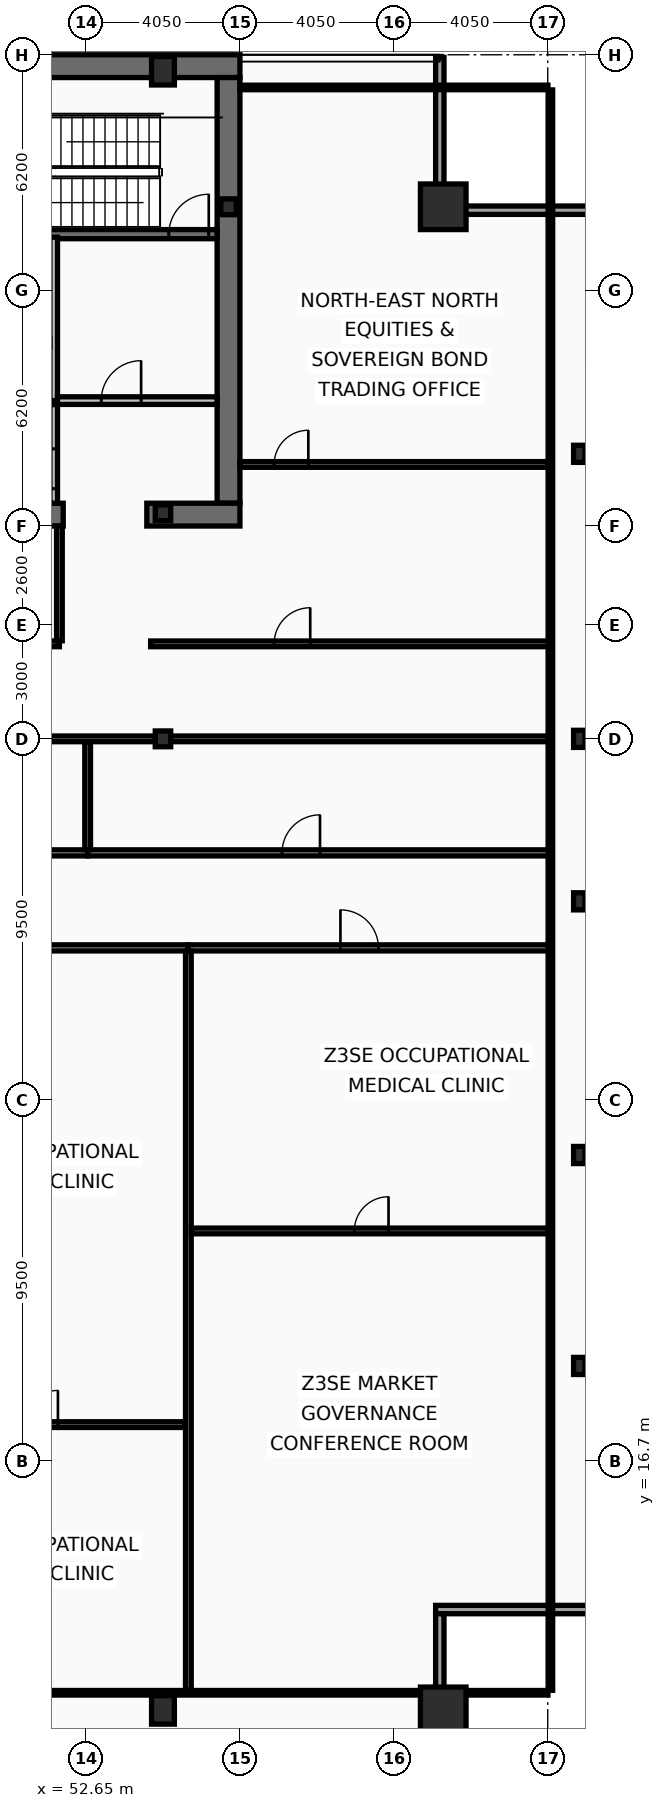
"""IFC4 building model, lengths in metres.
Left out: names, types, materials, properties, quantities, classifications, styles, units other than length and angle.
Written with IfcOpenShell. Run it as: python <this file> out.ifc"""

import sys

from ifc_helpers import new_model, si_unit, direction, frame, frame_2d, origin, origin_2d, place, context, subcontext, project, spatial, rectangle, hollow_rectangle, i_section, extrude, element, fill, save


model = new_model("IFC4")
c1 = context("Model", 3, precision=1e-05, world=origin(), true_north=direction((0.0, 1.0)))
c2 = subcontext(c1, "Body", "Model", "MODEL_VIEW")
j1 = project(units=[si_unit("LENGTHUNIT", "METRE"), si_unit("PLANEANGLEUNIT", "RADIAN")], contexts=[c1])
p1 = place(None, origin())
s1 = spatial("IfcSite", under=j1, at=p1, CompositionType="ELEMENT")
p2 = place(p1, origin())
s2 = spatial("IfcBuilding", under=s1, at=p2, CompositionType="ELEMENT")
p3 = place(p2, frame((0.0, 0.0, 224.6)))
s3 = spatial("IfcBuildingStorey", under=s2, at=p3, CompositionType="ELEMENT", Elevation=224.6)
p4 = place(p3, frame((16.2, 53.4, 0.0), z_axis=(0.0, 0.0, 1.0), x_axis=(1.0, 0.0, 0.0)))
e1 = element("IfcWall", 1, at=p4, inside=s3, PredefinedType="SHEAR", context=c2, shape_type="SweptSolid", body=[
    extrude(rectangle(XDim=40.5, YDim=0.6, at=frame_2d((20.25, 0.0))), origin(), (0.0, 0.0, 1.0), 3.44),
])
p5 = place(p3, frame((56.4, 53.1, 0.0), z_axis=(0.0, 0.0, 1.0), x_axis=(0.0, -1.0, 0.0)))
e2 = element("IfcWall", 2, at=p5, inside=s3, PredefinedType="SHEAR", context=c2, shape_type="SweptSolid", body=[
    extrude(rectangle(XDim=11.2, YDim=0.6, at=frame_2d((5.6, 0.0))), origin(), (0.0, 0.0, 1.0), 3.44),
])
p6 = place(p3, frame((52.05, 41.6, 0.0), z_axis=(0.0, 0.0, 1.0), x_axis=(-1.0, 0.0, 0.0)))
e3 = element("IfcWall", 3, at=p6, inside=s3, PredefinedType="SHEAR", context=c2, shape_type="SweptSolid", body=[
    extrude(rectangle(XDim=11.3, YDim=0.6, at=frame_2d((5.65, 0.0))), origin(), (0.0, 0.0, 1.0), 3.44),
])
p7 = place(p3, frame((56.7, 41.6, 0.0), z_axis=(0.0, 0.0, 1.0), x_axis=(-1.0, 0.0, 0.0)))
e4 = element("IfcWall", 4, at=p7, inside=s3, PredefinedType="SHEAR", context=c2, shape_type="SweptSolid", body=[
    extrude(rectangle(XDim=2.45, YDim=0.6, at=frame_2d((1.225, 0.0))), origin(), (0.0, 0.0, 1.0), 3.44),
])
p8 = place(p3, frame((48.63, 48.98, 0.0), z_axis=(0.0, 0.0, 1.0), x_axis=(1.0, 0.0, 0.0)))
e5 = element("IfcWall", 5, at=p8, inside=s3, PredefinedType="SHEAR", context=c2, shape_type="SweptSolid", body=[
    extrude(rectangle(XDim=7.47, YDim=0.24, at=frame_2d((3.735, 0.0))), origin(), (0.0, 0.0, 1.0), 3.44),
])
p9 = place(p8, frame((6.2, 0.0, 0.0)))
e6 = element("IfcOpeningElement", 6, at=p9, cuts=e5, PredefinedType="OPENING", context=c2, shape_type="SweptSolid", body=[
    extrude(rectangle(XDim=1.05, YDim=2.15, at=frame_2d((0.525, 1.075))), frame((0.0, 0.13, 0.0), z_axis=(0.0, -1.0, 0.0), x_axis=(1.0, 0.0, 0.0)), (0.0, 0.0, 1.0), 0.26),
])
for number, where, z_axis, x_axis in (
    (7, (62.05, 10.15, 0.0), (0.0, 0.0, 1.0), (1.0, 0.0, 0.0)),
    (8, (62.05, 49.7, 0.0), (0.0, 0.0, 1.0), (1.0, 0.0, 0.0)),
):
    element("IfcColumn", number, at=place(p3, frame(where, z_axis=z_axis, x_axis=x_axis)), inside=s3, PredefinedType="COLUMN", context=c2, shape_type="SweptSolid", body=[
        extrude(hollow_rectangle(XDim=1.2, YDim=1.2, WallThickness=0.06, at=origin_2d()), origin(), (0.0, 0.0, 1.0), 3.6),
    ])
for number, where, z_axis, x_axis in (
    (9, (54.675, 10.15, 0.0), (0.0, 0.0, 1.0), (1.0, 0.0, 0.0)),
    (10, (54.675, 53.28, 0.0), (0.0, 0.0, 1.0), (1.0, 0.0, 0.0)),
):
    element("IfcColumn", number, at=place(p3, frame(where, z_axis=z_axis, x_axis=x_axis)), inside=s3, PredefinedType="COLUMN", context=c2, shape_type="SweptSolid", body=[
        extrude(hollow_rectangle(XDim=0.6, YDim=0.75, WallThickness=0.045, at=origin_2d()), origin(), (0.0, 0.0, 1.0), 3.6),
    ])
for number, where, z_axis, x_axis in (
    (11, (65.63, 19.2, 0.0), (0.0, 0.0, 1.0), (1.0, 0.0, 0.0)),
    (12, (65.63, 24.75, 0.0), (0.0, 0.0, 1.0), (1.0, 0.0, 0.0)),
    (13, (65.63, 31.425, 0.0), (0.0, 0.0, 1.0), (1.0, 0.0, 0.0)),
    (14, (65.63, 35.7, 0.0), (0.0, 0.0, 1.0), (1.0, 0.0, 0.0)),
    (15, (65.63, 43.2, 0.0), (0.0, 0.0, 1.0), (1.0, 0.0, 0.0)),
):
    element("IfcColumn", number, at=place(p3, frame(where, z_axis=z_axis, x_axis=x_axis)), inside=s3, PredefinedType="COLUMN", context=c2, shape_type="SweptSolid", body=[
        extrude(i_section(OverallWidth=0.3, OverallDepth=0.45, WebThickness=0.014, FlangeThickness=0.026, at=origin_2d()), origin(), (0.0, 0.0, 1.0), 3.6),
    ])
for number, where, z_axis, x_axis in (
    (16, (56.4, 49.7, 0.0), (0.0, 0.0, 1.0), (1.0, 0.0, 0.0)),
    (17, (54.675, 35.7, 0.0), (0.0, 0.0, 1.0), (1.0, 0.0, 0.0)),
    (18, (54.675, 41.65, 0.0), (0.0, 0.0, 1.0), (1.0, 0.0, 0.0)),
):
    element("IfcColumn", number, at=place(p3, frame(where, z_axis=z_axis, x_axis=x_axis)), inside=s3, PredefinedType="COLUMN", context=c2, shape_type="SweptSolid", body=[
        extrude(i_section(OverallWidth=0.406, OverallDepth=0.416, WebThickness=0.03, FlangeThickness=0.048, at=origin_2d()), origin(), (0.0, 0.0, 1.0), 3.6),
    ])
p10 = place(p3, frame((61.96, 53.63, 0.0), z_axis=(0.0, 0.0, 1.0), x_axis=(0.0, -1.0, 0.0)))
e19 = element("IfcWall", 19, at=p10, inside=s3, PredefinedType="SOLIDWALL", context=c2, shape_type="SweptSolid", body=[
    extrude(rectangle(XDim=3.91, YDim=0.22, at=frame_2d((1.955, 0.0))), origin(), (0.0, 0.0, 1.0), 2.83),
])
for number, where, z_axis, x_axis in (
    (20, (61.85, 49.61, 0.0), (0.0, 0.0, 1.0), (1.0, 0.0, 0.0)),
    (21, (66.07, 12.79, 0.0), (0.0, 0.0, 1.0), (-1.0, 0.0, 0.0)),
):
    element("IfcWall", number, at=place(p3, frame(where, z_axis=z_axis, x_axis=x_axis)), inside=s3, PredefinedType="SOLIDWALL", context=c2, shape_type="SweptSolid", body=[
        extrude(rectangle(XDim=4.22, YDim=0.22, at=frame_2d((2.11, 0.0))), origin(), (0.0, 0.0, 1.0), 2.83),
    ])
p11 = place(p3, frame((61.96, 12.68, 0.0), z_axis=(0.0, 0.0, 1.0), x_axis=(0.0, -1.0, 0.0)))
e22 = element("IfcWall", 22, at=p11, inside=s3, PredefinedType="SOLIDWALL", context=c2, shape_type="SweptSolid", body=[
    extrude(rectangle(XDim=3.91, YDim=0.22, at=frame_2d((1.955, 0.0))), origin(), (0.0, 0.0, 1.0), 2.83),
])
p12 = place(p3, frame((51.8, 44.6, 0.0), z_axis=(0.0, 0.0, 1.0), x_axis=(0.0, 1.0, 0.0)))
e23 = element("IfcWall", 23, at=p12, inside=s3, PredefinedType="PARTITIONING", context=c2, shape_type="SweptSolid", body=[
    extrude(rectangle(XDim=4.3, YDim=0.2, at=frame_2d((2.15, 0.0))), origin(), (0.0, 0.0, 1.0), 3.44),
])
p13 = place(p3, frame((51.9, 44.6, 0.0), z_axis=(0.0, 0.0, 1.0), x_axis=(1.0, 0.0, 0.0)))
e24 = element("IfcWall", 24, at=p13, inside=s3, PredefinedType="PARTITIONING", context=c2, shape_type="SweptSolid", body=[
    extrude(rectangle(XDim=4.2, YDim=0.2, at=frame_2d((2.1, 0.0))), origin(), (0.0, 0.0, 1.0), 3.44),
])
p14 = place(p13, frame((1.15, 0.0, 0.0)))
e25 = element("IfcOpeningElement", 25, at=p14, cuts=e24, PredefinedType="OPENING", context=c2, shape_type="SweptSolid", body=[
    extrude(rectangle(XDim=1.05, YDim=2.15, at=frame_2d((0.525, 1.075))), frame((0.0, 0.11, 0.0), z_axis=(0.0, -1.0, 0.0), x_axis=(1.0, 0.0, 0.0)), (0.0, 0.0, 1.0), 0.22),
])
p15 = place(p3, frame((51.8, 41.9, 0.0), z_axis=(0.0, 0.0, 1.0), x_axis=(0.0, 1.0, 0.0)))
e26 = element("IfcWall", 26, at=p15, inside=s3, PredefinedType="PARTITIONING", context=c2, shape_type="SweptSolid", body=[
    extrude(rectangle(XDim=2.595, YDim=0.2, at=frame_2d((1.298, 0.0))), origin(), (0.0, 0.0, 1.0), 3.44),
])
p16 = place(p15, frame((0.38, 0.0, 0.0)))
e27 = element("IfcOpeningElement", 27, at=p16, cuts=e26, PredefinedType="OPENING", context=c2, shape_type="SweptSolid", body=[
    extrude(rectangle(XDim=1.05, YDim=2.15, at=frame_2d((0.525, 1.075))), frame((0.0, 0.11, 0.0), z_axis=(0.0, -1.0, 0.0), x_axis=(1.0, 0.0, 0.0)), (0.0, 0.0, 1.0), 0.22),
])
p17 = place(p3, frame((47.8, 38.2, 0.0), z_axis=(0.0, 0.0, 1.0), x_axis=(1.0, 0.0, 0.0)))
e28 = element("IfcWall", 28, at=p17, inside=s3, PredefinedType="PARTITIONING", context=c2, shape_type="SweptSolid", body=[
    extrude(rectangle(XDim=4.15, YDim=0.15, at=frame_2d((2.075, 0.0))), origin(), (0.0, 0.0, 1.0), 2.78),
])
p18 = place(p17, frame((1.1, 0.0, 0.0)))
e29 = element("IfcOpeningElement", 29, at=p18, cuts=e28, PredefinedType="OPENING", context=c2, shape_type="SweptSolid", body=[
    extrude(rectangle(XDim=1.0, YDim=2.05, at=frame_2d((0.5, 1.025))), frame((0.0, 0.085, 0.0), z_axis=(0.0, -1.0, 0.0), x_axis=(1.0, 0.0, 0.0)), (0.0, 0.0, 1.0), 0.17),
])
p19 = place(p3, frame((51.95, 38.28, 0.0), z_axis=(0.0, 0.0, 1.0), x_axis=(0.0, 1.0, 0.0)))
e30 = element("IfcWall", 30, at=p19, inside=s3, PredefinedType="PARTITIONING", context=c2, shape_type="SweptSolid", body=[
    extrude(rectangle(XDim=3.02, YDim=0.15, at=frame_2d((1.51, 0.0))), origin(), (0.0, 0.0, 1.0), 3.44),
])
p20 = place(p3, frame((54.35, 38.2, 0.0), z_axis=(0.0, 0.0, 1.0), x_axis=(1.0, 0.0, 0.0)))
e31 = element("IfcWall", 31, at=p20, inside=s3, PredefinedType="PARTITIONING", context=c2, shape_type="SweptSolid", body=[
    extrude(rectangle(XDim=10.52, YDim=0.15, at=frame_2d((5.26, 0.0))), origin(), (0.0, 0.0, 1.0), 2.78),
])
p21 = place(p20, frame((3.25, 0.0, 0.0)))
e32 = element("IfcOpeningElement", 32, at=p21, cuts=e31, PredefinedType="OPENING", context=c2, shape_type="SweptSolid", body=[
    extrude(rectangle(XDim=0.95, YDim=2.05, at=frame_2d((0.475, 1.025))), frame((0.0, 0.085, 0.0), z_axis=(0.0, -1.0, 0.0), x_axis=(1.0, 0.0, 0.0)), (0.0, 0.0, 1.0), 0.17),
])
p22 = place(p3, frame((56.7, 42.92, 0.0), z_axis=(0.0, 0.0, 1.0), x_axis=(1.0, 0.0, 0.0)))
e33 = element("IfcWall", 33, at=p22, inside=s3, PredefinedType="PARTITIONING", context=c2, shape_type="SweptSolid", body=[
    extrude(rectangle(XDim=8.105, YDim=0.15, at=frame_2d((4.052, 0.0))), origin(), (0.0, 0.0, 1.0), 2.78),
])
p23 = place(p22, frame((0.9, 0.0, 0.0)))
e34 = element("IfcOpeningElement", 34, at=p23, cuts=e33, PredefinedType="OPENING", context=c2, shape_type="SweptSolid", body=[
    extrude(rectangle(XDim=0.9, YDim=2.05, at=frame_2d((0.45, 1.025))), frame((0.0, 0.085, 0.0), z_axis=(0.0, -1.0, 0.0), x_axis=(1.0, 0.0, 0.0)), (0.0, 0.0, 1.0), 0.17),
])
p24 = place(p3, frame((39.88, 35.7, 0.0), z_axis=(0.0, 0.0, 1.0), x_axis=(1.0, 0.0, 0.0)))
e35 = element("IfcWall", 35, at=p24, inside=s3, PredefinedType="PARTITIONING", context=c2, shape_type="SweptSolid", body=[
    extrude(rectangle(XDim=24.925, YDim=0.15, at=frame_2d((12.462, 0.0))), origin(), (0.0, 0.0, 1.0), 2.78),
])
p25 = place(p3, frame((47.321, 30.2, 0.0), z_axis=(0.0, 0.0, 1.0), x_axis=(1.0, 0.0, 0.0)))
e36 = element("IfcWall", 36, at=p25, inside=s3, PredefinedType="PARTITIONING", context=c2, shape_type="SweptSolid", body=[
    extrude(rectangle(XDim=8.022, YDim=0.16, at=frame_2d((4.011, 0.0))), origin(), (0.0, 0.0, 1.0), 2.78),
])
p26 = place(p25, frame((3.369, 0.0, 0.0)))
e37 = element("IfcOpeningElement", 37, at=p26, cuts=e36, PredefinedType="OPENING", context=c2, shape_type="SweptSolid", body=[
    extrude(rectangle(XDim=1.0, YDim=2.05, at=frame_2d((0.5, 1.025))), frame((0.0, 0.09, 0.0), z_axis=(0.0, -1.0, 0.0), x_axis=(1.0, 0.0, 0.0)), (0.0, 0.0, 1.0), 0.18),
])
p27 = place(p3, frame((47.401, 17.656, 0.0), z_axis=(0.0, 0.0, 1.0), x_axis=(1.0, 0.0, 0.0)))
e38 = element("IfcWall", 38, at=p27, inside=s3, PredefinedType="PARTITIONING", context=c2, shape_type="SweptSolid", body=[
    extrude(rectangle(XDim=7.863, YDim=0.15, at=frame_2d((3.931, 0.0))), origin(), (0.0, 0.0, 1.0), 2.78),
])
p28 = place(p27, frame((3.61, 0.0, 0.0)))
e39 = element("IfcOpeningElement", 39, at=p28, cuts=e38, PredefinedType="OPENING", context=c2, shape_type="SweptSolid", body=[
    extrude(rectangle(XDim=0.9, YDim=2.05, at=frame_2d((0.45, 1.025))), frame((0.0, 0.085, 0.0), z_axis=(0.0, -1.0, 0.0), x_axis=(1.0, 0.0, 0.0)), (0.0, 0.0, 1.0), 0.17),
])
p29 = place(p3, frame((55.344, 30.2, 0.0), z_axis=(0.0, 0.0, 1.0), x_axis=(1.0, 0.0, 0.0)))
e40 = element("IfcWall", 40, at=p29, inside=s3, PredefinedType="PARTITIONING", context=c2, shape_type="SweptSolid", body=[
    extrude(rectangle(XDim=9.527, YDim=0.16, at=frame_2d((4.763, 0.0))), origin(), (0.0, 0.0, 1.0), 3.44),
])
p30 = place(p29, frame((4.001, 0.0, 0.0)))
e41 = element("IfcOpeningElement", 41, at=p30, cuts=e40, PredefinedType="OPENING", context=c2, shape_type="SweptSolid", body=[
    extrude(rectangle(XDim=1.0, YDim=2.05, at=frame_2d((0.5, 1.025))), frame((0.0, 0.09, 0.0), z_axis=(0.0, -1.0, 0.0), x_axis=(1.0, 0.0, 0.0)), (0.0, 0.0, 1.0), 0.18),
])
p31 = place(p3, frame((55.344, 10.665, 0.0), z_axis=(0.0, 0.0, 1.0), x_axis=(0.0, 1.0, 0.0)))
e42 = element("IfcWall", 42, at=p31, inside=s3, PredefinedType="PARTITIONING", context=c2, shape_type="SweptSolid", body=[
    extrude(rectangle(XDim=19.45, YDim=0.15, at=frame_2d((9.725, 0.0))), origin(), (0.0, 0.0, 1.0), 2.78),
])
p32 = place(p3, frame((55.423, 22.752, 0.0), z_axis=(0.0, 0.0, 1.0), x_axis=(1.0, 0.0, 0.0)))
e43 = element("IfcWall", 43, at=p32, inside=s3, PredefinedType="PARTITIONING", context=c2, shape_type="SweptSolid", body=[
    extrude(rectangle(XDim=9.382, YDim=0.15, at=frame_2d((4.691, 0.0))), origin(), (0.0, 0.0, 1.0), 3.44),
])
p33 = place(p32, frame((4.287, 0.0, 0.0)))
e44 = element("IfcOpeningElement", 44, at=p33, cuts=e43, PredefinedType="OPENING", context=c2, shape_type="SweptSolid", body=[
    extrude(rectangle(XDim=0.9, YDim=2.05, at=frame_2d((0.45, 1.025))), frame((0.0, 0.085, 0.0), z_axis=(0.0, -1.0, 0.0), x_axis=(1.0, 0.0, 0.0)), (0.0, 0.0, 1.0), 0.17),
])
p34 = place(p3, frame((39.8, 32.7, 0.0), z_axis=(0.0, 0.0, 1.0), x_axis=(1.0, 0.0, 0.0)))
e45 = element("IfcWall", 45, at=p34, inside=s3, PredefinedType="PARTITIONING", context=c2, shape_type="SweptSolid", body=[
    extrude(rectangle(XDim=12.893, YDim=0.16, at=frame_2d((6.447, 0.0))), origin(), (0.0, 0.0, 1.0), 2.78),
])
p35 = place(p34, frame((5.415, 0.0, 0.0)))
e46 = element("IfcOpeningElement", 46, at=p35, cuts=e45, PredefinedType="OPENING", context=c2, shape_type="SweptSolid", body=[
    extrude(rectangle(XDim=1.0, YDim=2.05, at=frame_2d((0.5, 1.025))), frame((0.0, 0.09, 0.0), z_axis=(0.0, -1.0, 0.0), x_axis=(1.0, 0.0, 0.0)), (0.0, 0.0, 1.0), 0.18),
])
p36 = place(p3, frame((52.693, 32.7, 0.0), z_axis=(0.0, 0.0, 1.0), x_axis=(1.0, 0.0, 0.0)))
e47 = element("IfcWall", 47, at=p36, inside=s3, PredefinedType="PARTITIONING", context=c2, shape_type="SweptSolid", body=[
    extrude(rectangle(XDim=12.177, YDim=0.16, at=frame_2d((6.088, 0.0))), origin(), (0.0, 0.0, 1.0), 2.78),
])
p37 = place(p36, frame((5.114, 0.0, 0.0)))
e48 = element("IfcOpeningElement", 48, at=p37, cuts=e47, PredefinedType="OPENING", context=c2, shape_type="SweptSolid", body=[
    extrude(rectangle(XDim=1.0, YDim=2.05, at=frame_2d((0.5, 1.025))), frame((0.0, 0.09, 0.0), z_axis=(0.0, -1.0, 0.0), x_axis=(1.0, 0.0, 0.0)), (0.0, 0.0, 1.0), 0.18),
])
p38 = place(p3, frame((52.693, 32.785, 0.0), z_axis=(0.0, 0.0, 1.0), x_axis=(0.0, 1.0, 0.0)))
e49 = element("IfcWall", 49, at=p38, inside=s3, PredefinedType="PARTITIONING", context=c2, shape_type="SweptSolid", body=[
    extrude(rectangle(XDim=2.835, YDim=0.15, at=frame_2d((1.417, 0.0))), origin(), (0.0, 0.0, 1.0), 2.98),
])
p39 = place(p3, frame((64.87, 10.665, 0.0), z_axis=(0.0, 0.0, 1.0), x_axis=(0.0, 1.0, 0.0)))
e50 = element("IfcWall", 50, at=p39, inside=s3, PredefinedType="PARTITIONING", context=c2, shape_type="SweptSolid", body=[
    extrude(rectangle(XDim=42.11, YDim=0.12, at=frame_2d((21.055, 0.0))), origin(), (0.0, 0.0, 1.0), 2.78),
])
p40 = place(p3, frame((56.7, 52.84, 0.0), z_axis=(0.0, 0.0, 1.0), x_axis=(1.0, 0.0, 0.0)))
e51 = element("IfcWall", 51, at=p40, inside=s3, PredefinedType="PARTITIONING", context=c2, shape_type="SweptSolid", body=[
    extrude(rectangle(XDim=8.105, YDim=0.12, at=frame_2d((4.052, 0.0))), origin(), (0.0, 0.0, 1.0), 3.44),
])
p41 = place(p3, frame((8.095, 10.6, 0.0), z_axis=(0.0, 0.0, 1.0), x_axis=(1.0, 0.0, 0.0)))
e52 = element("IfcWall", 52, at=p41, inside=s3, PredefinedType="PARTITIONING", context=c2, shape_type="SweptSolid", body=[
    extrude(rectangle(XDim=56.71, YDim=0.12, at=frame_2d((28.355, 0.0))), origin(), (0.0, 0.0, 1.0), 2.78),
])
p42 = place(p9, origin())
e53 = element("IfcDoor", 53, at=p42, inside=s3, OperationType="SINGLE_SWING_RIGHT", PredefinedType="DOOR", context=c2, shape_type="SweptSolid", body=[
    extrude(rectangle(XDim=1.05, YDim=2.15, at=frame_2d((0.525, 1.075))), frame((0.0, 0.025, 0.0), z_axis=(0.0, -1.0, 0.0), x_axis=(1.0, 0.0, 0.0)), (0.0, 0.0, 1.0), 0.05),
])
fill(e6, e53)
p43 = place(p14, origin())
e54 = element("IfcDoor", 54, at=p43, inside=s3, OperationType="SINGLE_SWING_RIGHT", PredefinedType="DOOR", context=c2, shape_type="SweptSolid", body=[
    extrude(rectangle(XDim=1.05, YDim=2.15, at=frame_2d((0.525, 1.075))), frame((0.0, 0.025, 0.0), z_axis=(0.0, -1.0, 0.0), x_axis=(1.0, 0.0, 0.0)), (0.0, 0.0, 1.0), 0.05),
])
fill(e25, e54)
p44 = place(p16, origin())
e55 = element("IfcDoor", 55, at=p44, inside=s3, OperationType="SINGLE_SWING_LEFT", PredefinedType="DOOR", context=c2, shape_type="SweptSolid", body=[
    extrude(rectangle(XDim=1.05, YDim=2.15, at=frame_2d((0.525, 1.075))), frame((0.0, 0.025, 0.0), z_axis=(0.0, -1.0, 0.0), x_axis=(1.0, 0.0, 0.0)), (0.0, 0.0, 1.0), 0.05),
])
fill(e27, e55)
p45 = place(p21, origin())
e56 = element("IfcDoor", 56, at=p45, inside=s3, OperationType="SINGLE_SWING_RIGHT", PredefinedType="DOOR", context=c2, shape_type="SweptSolid", body=[
    extrude(rectangle(XDim=0.95, YDim=2.05, at=frame_2d((0.475, 1.025))), frame((0.0, 0.025, 0.0), z_axis=(0.0, -1.0, 0.0), x_axis=(1.0, 0.0, 0.0)), (0.0, 0.0, 1.0), 0.05),
])
fill(e32, e56)
p46 = place(p23, origin())
e57 = element("IfcDoor", 57, at=p46, inside=s3, OperationType="SINGLE_SWING_RIGHT", PredefinedType="DOOR", context=c2, shape_type="SweptSolid", body=[
    extrude(rectangle(XDim=0.9, YDim=2.05, at=frame_2d((0.45, 1.025))), frame((0.0, 0.025, 0.0), z_axis=(0.0, -1.0, 0.0), x_axis=(1.0, 0.0, 0.0)), (0.0, 0.0, 1.0), 0.05),
])
fill(e34, e57)
p47 = place(p28, origin())
e58 = element("IfcDoor", 58, at=p47, inside=s3, OperationType="SINGLE_SWING_RIGHT", PredefinedType="DOOR", context=c2, shape_type="SweptSolid", body=[
    extrude(rectangle(XDim=0.9, YDim=2.05, at=frame_2d((0.45, 1.025))), frame((0.0, 0.025, 0.0), z_axis=(0.0, -1.0, 0.0), x_axis=(1.0, 0.0, 0.0)), (0.0, 0.0, 1.0), 0.05),
])
fill(e39, e58)
p48 = place(p30, origin())
e59 = element("IfcDoor", 59, at=p48, inside=s3, OperationType="SINGLE_SWING_LEFT", PredefinedType="DOOR", context=c2, shape_type="SweptSolid", body=[
    extrude(rectangle(XDim=1.0, YDim=2.05, at=frame_2d((0.5, 1.025))), frame((0.0, 0.025, 0.0), z_axis=(0.0, -1.0, 0.0), x_axis=(1.0, 0.0, 0.0)), (0.0, 0.0, 1.0), 0.05),
])
fill(e41, e59)
p49 = place(p33, origin())
e60 = element("IfcDoor", 60, at=p49, inside=s3, OperationType="SINGLE_SWING_RIGHT", PredefinedType="DOOR", context=c2, shape_type="SweptSolid", body=[
    extrude(rectangle(XDim=0.9, YDim=2.05, at=frame_2d((0.45, 1.025))), frame((0.0, 0.025, 0.0), z_axis=(0.0, -1.0, 0.0), x_axis=(1.0, 0.0, 0.0)), (0.0, 0.0, 1.0), 0.05),
])
fill(e44, e60)
p50 = place(p37, origin())
e61 = element("IfcDoor", 61, at=p50, inside=s3, OperationType="SINGLE_SWING_RIGHT", PredefinedType="DOOR", context=c2, shape_type="SweptSolid", body=[
    extrude(rectangle(XDim=1.0, YDim=2.05, at=frame_2d((0.5, 1.025))), frame((0.0, 0.025, 0.0), z_axis=(0.0, -1.0, 0.0), x_axis=(1.0, 0.0, 0.0)), (0.0, 0.0, 1.0), 0.05),
])
fill(e48, e61)
save(model, sys.argv[1])
